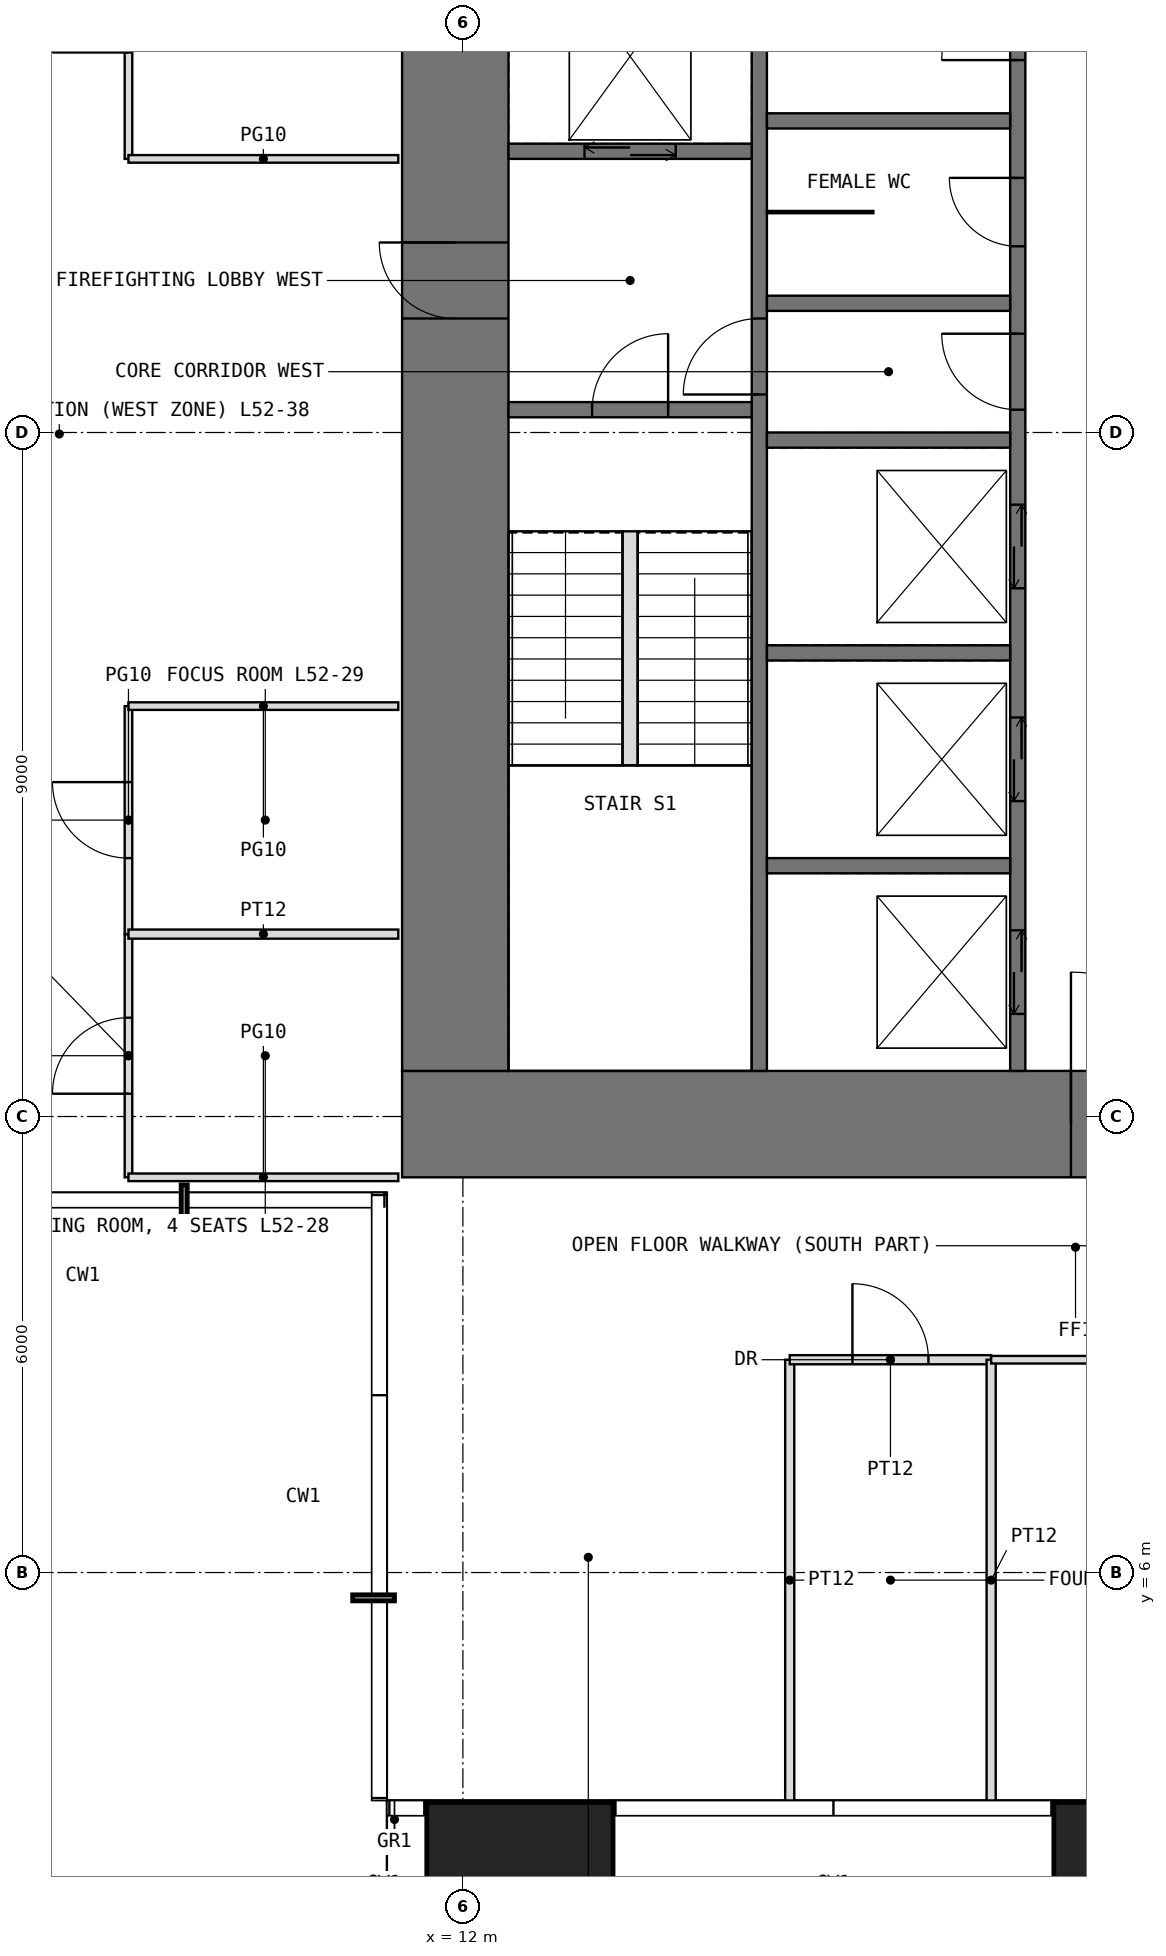
"""IFC4 building model, lengths in metres.
Left out: names, types, materials, properties, quantities, classifications, styles, units other than length and angle.
Written with IfcOpenShell. Run it as: python <this file> out.ifc"""

import sys

from ifc_helpers import new_model, si_unit, direction, frame, frame_2d, origin, origin_2d, place, context, subcontext, project, spatial, rectangle, extrude, element, fill, save


model = new_model("IFC4")
c1 = context("Model", 3, precision=1e-05, world=origin(), true_north=direction((0.0, 1.0)))
c2 = subcontext(c1, "Body", "Model", "MODEL_VIEW")
j1 = project(units=[si_unit("LENGTHUNIT", "METRE"), si_unit("PLANEANGLEUNIT", "RADIAN")], contexts=[c1])
p1 = place(None, origin())
s1 = spatial("IfcSite", under=j1, at=p1, CompositionType="ELEMENT")
p2 = place(p1, origin())
s2 = spatial("IfcBuilding", under=s1, at=p2, CompositionType="ELEMENT")
p3 = place(p2, frame((0.0, 0.0, 218.5)))
s3 = spatial("IfcBuildingStorey", under=s2, at=p3, CompositionType="ELEMENT", Elevation=218.5)
for number, where, z_axis, x_axis in (
    (1, (12.75, 1.75, 0.0), (0.0, 0.0, 1.0), (1.0, 0.0, 0.0)),
    (2, (21.0, 1.75, 0.0), (0.0, 0.0, 1.0), (1.0, 0.0, 0.0)),
):
    element("IfcColumn", number, at=place(p3, frame(where, z_axis=z_axis, x_axis=x_axis)), inside=s3, PredefinedType="COLUMN", context=c2, shape_type="SweptSolid", body=[
        extrude(rectangle(XDim=2.45, YDim=2.45, at=origin_2d()), origin(), (0.0, 0.0, 1.0), 4.0),
    ])
p4 = place(p3, frame((11.2, 11.9, -0.05), z_axis=(0.0, 0.0, 1.0), x_axis=(1.0, 0.0, 0.0)))
e3 = element("IfcWall", 3, at=p4, inside=s3, PredefinedType="SHEAR", context=c2, shape_type="SweptSolid", body=[
    extrude(rectangle(XDim=19.6, YDim=1.4, at=frame_2d((9.8, 0.0))), origin(), (0.0, 0.0, 1.0), 4.0),
])
p5 = place(p4, frame((8.8, 0.0, 0.05)))
e4 = element("IfcOpeningElement", 4, at=p5, cuts=e3, PredefinedType="OPENING", context=c2, shape_type="SweptSolid", body=[
    extrude(rectangle(XDim=2.0, YDim=2.2, at=frame_2d((1.0, 1.1))), frame((0.0, 0.71, 0.0), z_axis=(0.0, -1.0, 0.0), x_axis=(1.0, 0.0, 0.0)), (0.0, 0.0, 1.0), 1.42),
])
p6 = place(p3, frame((11.9, 12.6, -0.05), z_axis=(0.0, 0.0, 1.0), x_axis=(0.0, 1.0, 0.0)))
e5 = element("IfcWall", 5, at=p6, inside=s3, PredefinedType="SHEAR", context=c2, shape_type="SweptSolid", body=[
    extrude(rectangle(XDim=16.8, YDim=1.4, at=frame_2d((8.4, 0.0))), origin(), (0.0, 0.0, 1.0), 4.0),
])
p7 = place(p6, frame((9.9, 0.0, 0.05)))
e6 = element("IfcOpeningElement", 6, at=p7, cuts=e5, PredefinedType="OPENING", context=c2, shape_type="SweptSolid", body=[
    extrude(rectangle(XDim=1.0, YDim=2.2, at=frame_2d((0.5, 1.1))), frame((0.0, 0.71, 0.0), z_axis=(0.0, -1.0, 0.0), x_axis=(1.0, 0.0, 0.0)), (0.0, 0.0, 1.0), 1.42),
])
p8 = place(p3, frame((15.9, 12.6, -0.05), z_axis=(0.0, 0.0, 1.0), x_axis=(0.0, 1.0, 0.0)))
e7 = element("IfcWall", 7, at=p8, inside=s3, PredefinedType="SHEAR", context=c2, shape_type="SweptSolid", body=[
    extrude(rectangle(XDim=16.8, YDim=0.2, at=frame_2d((8.4, 0.0))), origin(), (0.0, 0.0, 1.0), 4.0),
])
p9 = place(p8, frame((8.9, 0.0, 0.05)))
e8 = element("IfcOpeningElement", 8, at=p9, cuts=e7, PredefinedType="OPENING", context=c2, shape_type="SweptSolid", body=[
    extrude(rectangle(XDim=1.0, YDim=2.2, at=frame_2d((0.5, 1.1))), frame((0.0, 0.11, 0.0), z_axis=(0.0, -1.0, 0.0), x_axis=(1.0, 0.0, 0.0)), (0.0, 0.0, 1.0), 0.22),
])
p10 = place(p3, frame((19.3, 12.6, -0.05), z_axis=(0.0, 0.0, 1.0), x_axis=(0.0, 1.0, 0.0)))
e9 = element("IfcWall", 9, at=p10, inside=s3, PredefinedType="SHEAR", context=c2, shape_type="SweptSolid", body=[
    extrude(rectangle(XDim=16.8, YDim=0.2, at=frame_2d((8.4, 0.0))), origin(), (0.0, 0.0, 1.0), 4.0),
])
p11 = place(p10, frame((8.7, 0.0, 0.05)))
e10 = element("IfcOpeningElement", 10, at=p11, cuts=e9, PredefinedType="OPENING", context=c2, shape_type="SweptSolid", body=[
    extrude(rectangle(XDim=1.0, YDim=2.2, at=frame_2d((0.5, 1.1))), frame((0.0, 0.11, 0.0), z_axis=(0.0, -1.0, 0.0), x_axis=(1.0, 0.0, 0.0)), (0.0, 0.0, 1.0), 0.22),
])
p12 = place(p10, frame((10.85, 0.0, 0.05)))
e11 = element("IfcOpeningElement", 11, at=p12, cuts=e9, PredefinedType="OPENING", context=c2, shape_type="SweptSolid", body=[
    extrude(rectangle(XDim=0.9, YDim=2.2, at=frame_2d((0.45, 1.1))), frame((0.0, 0.11, 0.0), z_axis=(0.0, -1.0, 0.0), x_axis=(1.0, 0.0, 0.0)), (0.0, 0.0, 1.0), 0.22),
])
p13 = place(p10, frame((13.3, 0.0, 0.05)))
e12 = element("IfcOpeningElement", 12, at=p13, cuts=e9, PredefinedType="OPENING", context=c2, shape_type="SweptSolid", body=[
    extrude(rectangle(XDim=1.0, YDim=2.2, at=frame_2d((0.5, 1.1))), frame((0.0, 0.11, 0.0), z_axis=(0.0, -1.0, 0.0), x_axis=(1.0, 0.0, 0.0)), (0.0, 0.0, 1.0), 0.22),
])
p14 = place(p10, frame((15.55, 0.0, 0.05)))
e13 = element("IfcOpeningElement", 13, at=p14, cuts=e9, PredefinedType="OPENING", context=c2, shape_type="SweptSolid", body=[
    extrude(rectangle(XDim=0.9, YDim=2.2, at=frame_2d((0.45, 1.1))), frame((0.0, 0.11, 0.0), z_axis=(0.0, -1.0, 0.0), x_axis=(1.0, 0.0, 0.0)), (0.0, 0.0, 1.0), 0.22),
])
p15 = place(p10, frame((0.75, 0.0, 0.05)))
e14 = element("IfcOpeningElement", 14, at=p15, cuts=e9, PredefinedType="OPENING", context=c2, shape_type="SweptSolid", body=[
    extrude(rectangle(XDim=1.1, YDim=2.2, at=frame_2d((0.55, 1.1))), frame((0.0, 0.11, 0.0), z_axis=(0.0, -1.0, 0.0), x_axis=(1.0, 0.0, 0.0)), (0.0, 0.0, 1.0), 0.22),
])
p16 = place(p10, frame((3.55, 0.0, 0.05)))
e15 = element("IfcOpeningElement", 15, at=p16, cuts=e9, PredefinedType="OPENING", context=c2, shape_type="SweptSolid", body=[
    extrude(rectangle(XDim=1.1, YDim=2.2, at=frame_2d((0.55, 1.1))), frame((0.0, 0.11, 0.0), z_axis=(0.0, -1.0, 0.0), x_axis=(1.0, 0.0, 0.0)), (0.0, 0.0, 1.0), 0.22),
])
p17 = place(p10, frame((6.35, 0.0, 0.05)))
e16 = element("IfcOpeningElement", 16, at=p17, cuts=e9, PredefinedType="OPENING", context=c2, shape_type="SweptSolid", body=[
    extrude(rectangle(XDim=1.1, YDim=2.2, at=frame_2d((0.55, 1.1))), frame((0.0, 0.11, 0.0), z_axis=(0.0, -1.0, 0.0), x_axis=(1.0, 0.0, 0.0)), (0.0, 0.0, 1.0), 0.22),
])
p18 = place(p3, frame((12.6, 21.3, -0.05), z_axis=(0.0, 0.0, 1.0), x_axis=(1.0, 0.0, 0.0)))
e17 = element("IfcWall", 17, at=p18, inside=s3, PredefinedType="SHEAR", context=c2, shape_type="SweptSolid", body=[
    extrude(rectangle(XDim=3.2, YDim=0.2, at=frame_2d((1.6, 0.0))), origin(), (0.0, 0.0, 1.0), 4.0),
])
p19 = place(p18, frame((1.1, 0.0, 0.05)))
e18 = element("IfcOpeningElement", 18, at=p19, cuts=e17, PredefinedType="OPENING", context=c2, shape_type="SweptSolid", body=[
    extrude(rectangle(XDim=1.0, YDim=2.2, at=frame_2d((0.5, 1.1))), frame((0.0, 0.11, 0.0), z_axis=(0.0, -1.0, 0.0), x_axis=(1.0, 0.0, 0.0)), (0.0, 0.0, 1.0), 0.22),
])
p20 = place(p3, frame((12.6, 24.7, -0.05), z_axis=(0.0, 0.0, 1.0), x_axis=(1.0, 0.0, 0.0)))
e19 = element("IfcWall", 19, at=p20, inside=s3, PredefinedType="SHEAR", context=c2, shape_type="SweptSolid", body=[
    extrude(rectangle(XDim=3.2, YDim=0.2, at=frame_2d((1.6, 0.0))), origin(), (0.0, 0.0, 1.0), 4.0),
])
p21 = place(p20, frame((1.0, 0.0, 0.05)))
e20 = element("IfcOpeningElement", 20, at=p21, cuts=e19, PredefinedType="OPENING", context=c2, shape_type="SweptSolid", body=[
    extrude(rectangle(XDim=1.2, YDim=2.2, at=frame_2d((0.6, 1.1))), frame((0.0, 0.11, 0.0), z_axis=(0.0, -1.0, 0.0), x_axis=(1.0, 0.0, 0.0)), (0.0, 0.0, 1.0), 0.22),
])
for number, where, z_axis, x_axis in (
    (21, (16.0, 15.3, -0.05), (0.0, 0.0, 1.0), (1.0, 0.0, 0.0)),
    (22, (16.0, 18.1, -0.05), (0.0, 0.0, 1.0), (1.0, 0.0, 0.0)),
    (23, (16.0, 20.9, -0.05), (0.0, 0.0, 1.0), (1.0, 0.0, 0.0)),
    (24, (16.0, 22.7, -0.05), (0.0, 0.0, 1.0), (1.0, 0.0, 0.0)),
    (25, (16.0, 25.1, -0.05), (0.0, 0.0, 1.0), (1.0, 0.0, 0.0)),
):
    element("IfcWall", number, at=place(p3, frame(where, z_axis=z_axis, x_axis=x_axis)), inside=s3, PredefinedType="SHEAR", context=c2, shape_type="SweptSolid", body=[
        extrude(rectangle(XDim=3.2, YDim=0.2, at=frame_2d((1.6, 0.0))), origin(), (0.0, 0.0, 1.0), 4.0),
    ])
p22 = place(p3, frame((16.0, 23.9, 0.0), z_axis=(0.0, 0.0, 1.0), x_axis=(1.0, 0.0, 0.0)))
e26 = element("IfcWall", 26, at=p22, inside=s3, PredefinedType="PARTITIONING", context=c2, shape_type="SweptSolid", body=[
    extrude(rectangle(XDim=1.4, YDim=0.03, at=frame_2d((0.7, 0.0))), origin(), (0.0, 0.0, 1.0), 3.75),
])
p23 = place(p3, frame((7.6, 11.2, 0.0), z_axis=(0.0, 0.0, 1.0), x_axis=(0.0, 1.0, 0.0)))
e27 = element("IfcWall", 27, at=p23, inside=s3, PredefinedType="PARTITIONING", context=c2, shape_type="SweptSolid", body=[
    extrude(rectangle(XDim=3.2, YDim=0.1, at=frame_2d((1.6, 0.0))), origin(), (0.0, 0.0, 1.0), 3.75),
])
p24 = place(p23, frame((1.1, 0.0, 0.0)))
e28 = element("IfcOpeningElement", 28, at=p24, cuts=e27, PredefinedType="OPENING", context=c2, shape_type="SweptSolid", body=[
    extrude(rectangle(XDim=1.0, YDim=2.4, at=frame_2d((0.5, 1.2))), frame((0.0, 0.06, 0.0), z_axis=(0.0, -1.0, 0.0), x_axis=(1.0, 0.0, 0.0)), (0.0, 0.0, 1.0), 0.12),
])
p25 = place(p3, frame((7.6, 11.2, 0.0), z_axis=(0.0, 0.0, 1.0), x_axis=(1.0, 0.0, 0.0)))
e29 = element("IfcWall", 29, at=p25, inside=s3, PredefinedType="PARTITIONING", context=c2, shape_type="SweptSolid", body=[
    extrude(rectangle(XDim=3.55, YDim=0.1, at=frame_2d((1.775, 0.0))), origin(), (0.0, 0.0, 1.0), 3.75),
])
p26 = place(p3, frame((7.6, 14.4, 0.0), z_axis=(0.0, 0.0, 1.0), x_axis=(0.0, 1.0, 0.0)))
e30 = element("IfcWall", 30, at=p26, inside=s3, PredefinedType="PARTITIONING", context=c2, shape_type="SweptSolid", body=[
    extrude(rectangle(XDim=3.0, YDim=0.1, at=frame_2d((1.5, 0.0))), origin(), (0.0, 0.0, 1.0), 3.75),
])
p27 = place(p26, frame((1.0, 0.0, 0.0)))
e31 = element("IfcOpeningElement", 31, at=p27, cuts=e30, PredefinedType="OPENING", context=c2, shape_type="SweptSolid", body=[
    extrude(rectangle(XDim=1.0, YDim=2.4, at=frame_2d((0.5, 1.2))), frame((0.0, 0.06, 0.0), z_axis=(0.0, -1.0, 0.0), x_axis=(1.0, 0.0, 0.0)), (0.0, 0.0, 1.0), 0.12),
])
p28 = place(p3, frame((7.6, 14.4, 0.0), z_axis=(0.0, 0.0, 1.0), x_axis=(1.0, 0.0, 0.0)))
e32 = element("IfcWall", 32, at=p28, inside=s3, PredefinedType="PARTITIONING", context=c2, shape_type="SweptSolid", body=[
    extrude(rectangle(XDim=3.55, YDim=0.12, at=frame_2d((1.775, 0.0))), origin(), (0.0, 0.0, 1.0), 3.75),
])
p29 = place(p3, frame((7.6, 17.4, 0.0), z_axis=(0.0, 0.0, 1.0), x_axis=(1.0, 0.0, 0.0)))
e33 = element("IfcWall", 33, at=p29, inside=s3, PredefinedType="PARTITIONING", context=c2, shape_type="SweptSolid", body=[
    extrude(rectangle(XDim=3.55, YDim=0.1, at=frame_2d((1.775, 0.0))), origin(), (0.0, 0.0, 1.0), 3.75),
])
p30 = place(p3, frame((7.6, 24.6, 0.0), z_axis=(0.0, 0.0, 1.0), x_axis=(0.0, 1.0, 0.0)))
e34 = element("IfcWall", 34, at=p30, inside=s3, PredefinedType="PARTITIONING", context=c2, shape_type="SweptSolid", body=[
    extrude(rectangle(XDim=3.8, YDim=0.1, at=frame_2d((1.9, 0.0))), origin(), (0.0, 0.0, 1.0), 3.75),
])
p31 = place(p30, frame((1.4, 0.0, 0.0)))
e35 = element("IfcOpeningElement", 35, at=p31, cuts=e34, PredefinedType="OPENING", context=c2, shape_type="SweptSolid", body=[
    extrude(rectangle(XDim=1.0, YDim=2.4, at=frame_2d((0.5, 1.2))), frame((0.0, 0.06, 0.0), z_axis=(0.0, -1.0, 0.0), x_axis=(1.0, 0.0, 0.0)), (0.0, 0.0, 1.0), 0.12),
])
p32 = place(p3, frame((7.6, 24.6, 0.0), z_axis=(0.0, 0.0, 1.0), x_axis=(1.0, 0.0, 0.0)))
e36 = element("IfcWall", 36, at=p32, inside=s3, PredefinedType="PARTITIONING", context=c2, shape_type="SweptSolid", body=[
    extrude(rectangle(XDim=3.55, YDim=0.1, at=frame_2d((1.775, 0.0))), origin(), (0.0, 0.0, 1.0), 3.75),
])
p33 = place(p3, frame((16.3, 3.0, 0.0), z_axis=(0.0, 0.0, 1.0), x_axis=(0.0, 1.0, 0.0)))
e37 = element("IfcWall", 37, at=p33, inside=s3, PredefinedType="PARTITIONING", context=c2, shape_type="SweptSolid", body=[
    extrude(rectangle(XDim=5.8, YDim=0.12, at=frame_2d((2.9, 0.0))), origin(), (0.0, 0.0, 1.0), 3.75),
])
p34 = place(p3, frame((16.3, 8.8, 0.0), z_axis=(0.0, 0.0, 1.0), x_axis=(1.0, 0.0, 0.0)))
e38 = element("IfcWall", 38, at=p34, inside=s3, PredefinedType="PARTITIONING", context=c2, shape_type="SweptSolid", body=[
    extrude(rectangle(XDim=2.65, YDim=0.12, at=frame_2d((1.325, 0.0))), origin(), (0.0, 0.0, 1.0), 3.75),
])
p35 = place(p34, frame((0.825, 0.0, 0.0)))
e39 = element("IfcOpeningElement", 39, at=p35, cuts=e38, PredefinedType="OPENING", context=c2, shape_type="SweptSolid", body=[
    extrude(rectangle(XDim=1.0, YDim=2.2, at=frame_2d((0.5, 1.1))), frame((0.0, 0.07, 0.0), z_axis=(0.0, -1.0, 0.0), x_axis=(1.0, 0.0, 0.0)), (0.0, 0.0, 1.0), 0.14),
])
p36 = place(p3, frame((18.95, 3.0, 0.0), z_axis=(0.0, 0.0, 1.0), x_axis=(0.0, 1.0, 0.0)))
e40 = element("IfcWall", 40, at=p36, inside=s3, PredefinedType="PARTITIONING", context=c2, shape_type="SweptSolid", body=[
    extrude(rectangle(XDim=5.8, YDim=0.12, at=frame_2d((2.9, 0.0))), origin(), (0.0, 0.0, 1.0), 3.75),
])
p37 = place(p3, frame((18.95, 8.8, 0.0), z_axis=(0.0, 0.0, 1.0), x_axis=(1.0, 0.0, 0.0)))
e41 = element("IfcWall", 41, at=p37, inside=s3, PredefinedType="PARTITIONING", context=c2, shape_type="SweptSolid", body=[
    extrude(rectangle(XDim=9.25, YDim=0.1, at=frame_2d((4.625, 0.0))), origin(), (0.0, 0.0, 1.0), 3.75),
])
p38 = place(p37, frame((4.125, 0.0, 0.0)))
e42 = element("IfcOpeningElement", 42, at=p38, cuts=e41, PredefinedType="OPENING", context=c2, shape_type="SweptSolid", body=[
    extrude(rectangle(XDim=1.0, YDim=2.4, at=frame_2d((0.5, 1.2))), frame((0.0, 0.06, 0.0), z_axis=(0.0, -1.0, 0.0), x_axis=(1.0, 0.0, 0.0)), (0.0, 0.0, 1.0), 0.12),
])
p39 = place(p3, frame((14.2, 16.62, 0.0), z_axis=(0.0, 0.0, 1.0), x_axis=(0.0, 1.0, 0.0)))
e43 = element("IfcWall", 43, at=p39, inside=s3, PredefinedType="PARTITIONING", context=c2, shape_type="SweptSolid", body=[
    extrude(rectangle(XDim=3.08, YDim=0.2, at=frame_2d((1.54, 0.0))), origin(), (0.0, 0.0, 1.0), 4.0),
])
p40 = place(p5, origin())
e44 = element("IfcDoor", 44, at=p40, inside=s3, OperationType="DOUBLE_DOOR_SINGLE_SWING", PredefinedType="DOOR", context=c2, shape_type="SweptSolid", body=[
    extrude(rectangle(XDim=2.0, YDim=2.2, at=frame_2d((1.0, 1.1))), frame((0.0, 0.025, 0.0), z_axis=(0.0, -1.0, 0.0), x_axis=(1.0, 0.0, 0.0)), (0.0, 0.0, 1.0), 0.05),
])
fill(e4, e44)
p41 = place(p7, origin())
e45 = element("IfcDoor", 45, at=p41, inside=s3, OperationType="SINGLE_SWING_RIGHT", PredefinedType="DOOR", context=c2, shape_type="SweptSolid", body=[
    extrude(rectangle(XDim=1.0, YDim=2.2, at=frame_2d((0.5, 1.1))), frame((0.0, 0.025, 0.0), z_axis=(0.0, -1.0, 0.0), x_axis=(1.0, 0.0, 0.0)), (0.0, 0.0, 1.0), 0.05),
])
fill(e6, e45)
p42 = place(p19, origin())
e46 = element("IfcDoor", 46, at=p42, inside=s3, OperationType="SINGLE_SWING_RIGHT", PredefinedType="DOOR", context=c2, shape_type="SweptSolid", body=[
    extrude(rectangle(XDim=1.0, YDim=2.2, at=frame_2d((0.5, 1.1))), frame((0.0, 0.025, 0.0), z_axis=(0.0, -1.0, 0.0), x_axis=(1.0, 0.0, 0.0)), (0.0, 0.0, 1.0), 0.05),
])
fill(e18, e46)
p43 = place(p9, origin())
e47 = element("IfcDoor", 47, at=p43, inside=s3, OperationType="SINGLE_SWING_LEFT", PredefinedType="DOOR", context=c2, shape_type="SweptSolid", body=[
    extrude(rectangle(XDim=1.0, YDim=2.2, at=frame_2d((0.5, 1.1))), frame((0.0, 0.025, 0.0), z_axis=(0.0, -1.0, 0.0), x_axis=(1.0, 0.0, 0.0)), (0.0, 0.0, 1.0), 0.05),
])
fill(e8, e47)
p44 = place(p11, origin())
e48 = element("IfcDoor", 48, at=p44, inside=s3, OperationType="SINGLE_SWING_RIGHT", PredefinedType="DOOR", context=c2, shape_type="SweptSolid", body=[
    extrude(rectangle(XDim=1.0, YDim=2.2, at=frame_2d((0.5, 1.1))), frame((0.0, 0.025, 0.0), z_axis=(0.0, -1.0, 0.0), x_axis=(1.0, 0.0, 0.0)), (0.0, 0.0, 1.0), 0.05),
])
fill(e10, e48)
p45 = place(p12, origin())
e49 = element("IfcDoor", 49, at=p45, inside=s3, OperationType="SINGLE_SWING_RIGHT", PredefinedType="DOOR", context=c2, shape_type="SweptSolid", body=[
    extrude(rectangle(XDim=0.9, YDim=2.2, at=frame_2d((0.45, 1.1))), frame((0.0, 0.025, 0.0), z_axis=(0.0, -1.0, 0.0), x_axis=(1.0, 0.0, 0.0)), (0.0, 0.0, 1.0), 0.05),
])
fill(e11, e49)
p46 = place(p13, origin())
e50 = element("IfcDoor", 50, at=p46, inside=s3, OperationType="SINGLE_SWING_LEFT", PredefinedType="DOOR", context=c2, shape_type="SweptSolid", body=[
    extrude(rectangle(XDim=1.0, YDim=2.2, at=frame_2d((0.5, 1.1))), frame((0.0, 0.025, 0.0), z_axis=(0.0, -1.0, 0.0), x_axis=(1.0, 0.0, 0.0)), (0.0, 0.0, 1.0), 0.05),
])
fill(e12, e50)
p47 = place(p35, origin())
e51 = element("IfcDoor", 51, at=p47, inside=s3, OperationType="SINGLE_SWING_LEFT", PredefinedType="DOOR", context=c2, shape_type="SweptSolid", body=[
    extrude(rectangle(XDim=1.0, YDim=2.2, at=frame_2d((0.5, 1.1))), frame((0.0, 0.025, 0.0), z_axis=(0.0, -1.0, 0.0), x_axis=(1.0, 0.0, 0.0)), (0.0, 0.0, 1.0), 0.05),
])
fill(e39, e51)
p48 = place(p24, origin())
e52 = element("IfcDoor", 52, at=p48, inside=s3, OperationType="SINGLE_SWING_LEFT", PredefinedType="DOOR", context=c2, shape_type="SweptSolid", body=[
    extrude(rectangle(XDim=1.0, YDim=2.4, at=frame_2d((0.5, 1.2))), frame((0.0, 0.025, 0.0), z_axis=(0.0, -1.0, 0.0), x_axis=(1.0, 0.0, 0.0)), (0.0, 0.0, 1.0), 0.05),
])
fill(e28, e52)
p49 = place(p27, origin())
e53 = element("IfcDoor", 53, at=p49, inside=s3, OperationType="SINGLE_SWING_RIGHT", PredefinedType="DOOR", context=c2, shape_type="SweptSolid", body=[
    extrude(rectangle(XDim=1.0, YDim=2.4, at=frame_2d((0.5, 1.2))), frame((0.0, 0.025, 0.0), z_axis=(0.0, -1.0, 0.0), x_axis=(1.0, 0.0, 0.0)), (0.0, 0.0, 1.0), 0.05),
])
fill(e31, e53)
p50 = place(p15, origin())
e54 = element("IfcDoor", 54, at=p50, inside=s3, OperationType="DOUBLE_DOOR_SLIDING", PredefinedType="DOOR", context=c2, shape_type="SweptSolid", body=[
    extrude(rectangle(XDim=1.1, YDim=2.2, at=frame_2d((0.55, 1.1))), frame((0.0, 0.025, 0.0), z_axis=(0.0, -1.0, 0.0), x_axis=(1.0, 0.0, 0.0)), (0.0, 0.0, 1.0), 0.05),
])
fill(e14, e54)
p51 = place(p16, origin())
e55 = element("IfcDoor", 55, at=p51, inside=s3, OperationType="DOUBLE_DOOR_SLIDING", PredefinedType="DOOR", context=c2, shape_type="SweptSolid", body=[
    extrude(rectangle(XDim=1.1, YDim=2.2, at=frame_2d((0.55, 1.1))), frame((0.0, 0.025, 0.0), z_axis=(0.0, -1.0, 0.0), x_axis=(1.0, 0.0, 0.0)), (0.0, 0.0, 1.0), 0.05),
])
fill(e15, e55)
p52 = place(p17, origin())
e56 = element("IfcDoor", 56, at=p52, inside=s3, OperationType="DOUBLE_DOOR_SLIDING", PredefinedType="DOOR", context=c2, shape_type="SweptSolid", body=[
    extrude(rectangle(XDim=1.1, YDim=2.2, at=frame_2d((0.55, 1.1))), frame((0.0, 0.025, 0.0), z_axis=(0.0, -1.0, 0.0), x_axis=(1.0, 0.0, 0.0)), (0.0, 0.0, 1.0), 0.05),
])
fill(e16, e56)
p53 = place(p21, origin())
e57 = element("IfcDoor", 57, at=p53, inside=s3, OperationType="DOUBLE_DOOR_SLIDING", PredefinedType="DOOR", context=c2, shape_type="SweptSolid", body=[
    extrude(rectangle(XDim=1.2, YDim=2.2, at=frame_2d((0.6, 1.1))), frame((0.0, 0.025, 0.0), z_axis=(0.0, -1.0, 0.0), x_axis=(1.0, 0.0, 0.0)), (0.0, 0.0, 1.0), 0.05),
])
fill(e20, e57)
save(model, sys.argv[1])
